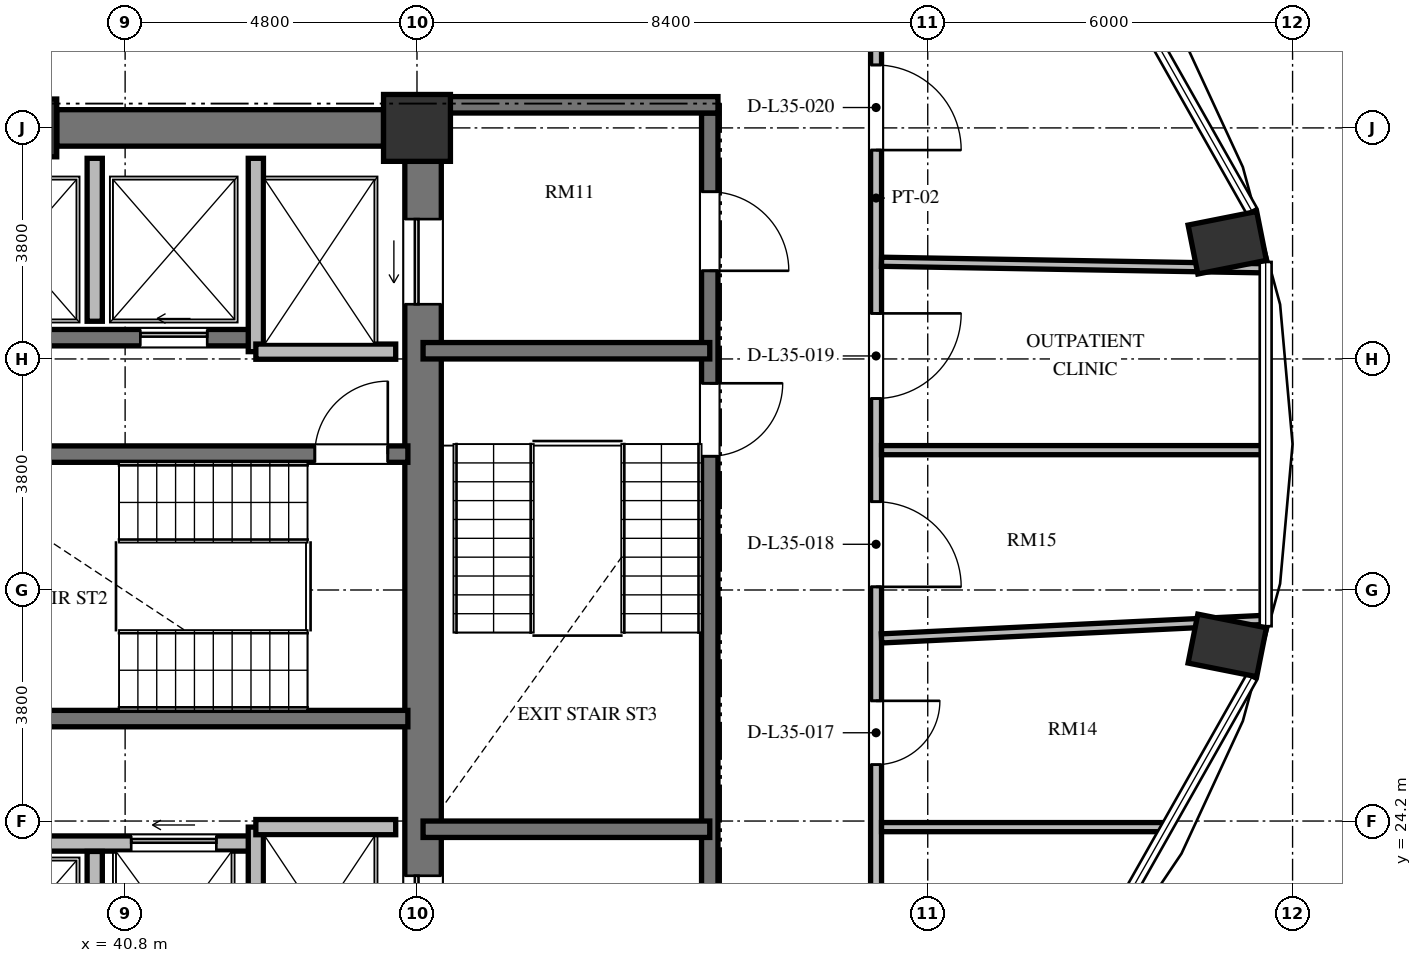
"""IFC4 building model, lengths in metres.
Left out: names, types, materials, properties, quantities, classifications, styles, units other than length and angle.
Written with IfcOpenShell. Run it as: python <this file> out.ifc"""

import sys

from ifc_helpers import new_model, si_unit, direction, frame, frame_2d, origin, origin_2d, place, context, subcontext, project, spatial, rectangle, extrude, element, fill, save


model = new_model("IFC4")
c1 = context("Model", 3, precision=1e-05, world=origin(), true_north=direction((0.0, 1.0)))
c2 = subcontext(c1, "Body", "Model", "MODEL_VIEW")
j1 = project(units=[si_unit("LENGTHUNIT", "METRE"), si_unit("PLANEANGLEUNIT", "RADIAN")], contexts=[c1])
p1 = place(None, origin())
s1 = spatial("IfcSite", under=j1, at=p1, CompositionType="ELEMENT")
p2 = place(p1, origin())
s2 = spatial("IfcBuilding", under=s1, at=p2, CompositionType="ELEMENT")
p3 = place(p2, frame((0.0, 0.0, 138.288)))
s3 = spatial("IfcBuildingStorey", under=s2, at=p3, CompositionType="ELEMENT", Elevation=138.288)
for number, where, z_axis, x_axis in (
    (1, (58.926, 27.088, 0.0), (0.0, 0.0, 1.0), (0.981, -0.195, 0.0)),
    (2, (58.926, 33.712, 0.0), (0.0, 0.0, 1.0), (0.981, 0.195, 0.0)),
):
    element("IfcColumn", number, at=place(p3, frame(where, z_axis=z_axis, x_axis=x_axis)), inside=s3, PredefinedType="COLUMN", context=c2, shape_type="SweptSolid", body=[
        extrude(rectangle(XDim=1.15, YDim=0.82, at=origin_2d()), origin(), (0.0, 0.0, 1.0), 3.648),
    ])
p4 = place(p3, frame((45.6, 35.6, 0.0), z_axis=(0.0, 0.0, 1.0), x_axis=(1.0, 0.0, 0.0)))
e3 = element("IfcColumn", 3, at=p4, inside=s3, PredefinedType="COLUMN", context=c2, shape_type="SweptSolid", body=[
    extrude(rectangle(XDim=1.1, YDim=1.1, at=origin_2d()), origin(), (0.0, 0.0, 1.0), 3.648),
])
p5 = place(p3, frame((39.2, 35.6, 0.0), z_axis=(0.0, 0.0, 1.0), x_axis=(1.0, 0.0, 0.0)))
e4 = element("IfcColumn", 4, at=p5, inside=s3, PredefinedType="COLUMN", context=c2, shape_type="SweptSolid", body=[
    extrude(rectangle(XDim=0.95, YDim=0.95, at=origin_2d()), origin(), (0.0, 0.0, 1.0), 3.648),
])
p6 = place(p3, frame((45.7, 20.95, 0.0), z_axis=(0.0, 0.0, 1.0), x_axis=(0.0, 1.0, 0.0)))
e5 = element("IfcWall", 5, at=p6, inside=s3, PredefinedType="SHEAR", context=c2, shape_type="SweptSolid", body=[
    extrude(rectangle(XDim=14.1, YDim=0.6, at=frame_2d((7.05, 0.0))), origin(), (0.0, 0.0, 1.0), 3.648),
])
p7 = place(p6, frame((11.75, 0.0, 0.0)))
e6 = element("IfcOpeningElement", 6, at=p7, cuts=e5, PredefinedType="OPENING", context=c2, shape_type="SweptSolid", body=[
    extrude(rectangle(XDim=1.4, YDim=2.3, at=frame_2d((0.7, 1.15))), frame((0.0, 0.31, 0.0), z_axis=(0.0, -1.0, 0.0), x_axis=(1.0, 0.0, 0.0)), (0.0, 0.0, 1.0), 0.62),
])
p8 = place(p6, frame((0.95, 0.0, 0.0)))
e7 = element("IfcOpeningElement", 7, at=p8, cuts=e5, PredefinedType="OPENING", context=c2, shape_type="SweptSolid", body=[
    extrude(rectangle(XDim=1.4, YDim=2.3, at=frame_2d((0.7, 1.15))), frame((0.0, 0.31, 0.0), z_axis=(0.0, -1.0, 0.0), x_axis=(1.0, 0.0, 0.0)), (0.0, 0.0, 1.0), 0.62),
])
p9 = place(p3, frame((39.675, 35.6, 0.0), z_axis=(0.0, 0.0, 1.0), x_axis=(1.0, 0.0, 0.0)))
e8 = element("IfcWall", 8, at=p9, inside=s3, PredefinedType="SHEAR", context=c2, shape_type="SweptSolid", body=[
    extrude(rectangle(XDim=5.375, YDim=0.6, at=frame_2d((2.688, 0.0))), origin(), (0.0, 0.0, 1.0), 3.648),
])
p10 = place(p3, frame((37.465, 30.235, 0.0), z_axis=(0.0, 0.0, 1.0), x_axis=(1.0, 0.0, 0.0)))
e9 = element("IfcWall", 9, at=p10, inside=s3, PredefinedType="SHEAR", context=c2, shape_type="SweptSolid", body=[
    extrude(rectangle(XDim=7.985, YDim=0.27, at=frame_2d((3.992, 0.0))), origin(), (0.0, 0.0, 1.0), 3.648),
])
p11 = place(p10, frame((6.455, 0.0, 0.0)))
e10 = element("IfcOpeningElement", 10, at=p11, cuts=e9, PredefinedType="OPENING", context=c2, shape_type="SweptSolid", body=[
    extrude(rectangle(XDim=1.2, YDim=2.15, at=frame_2d((0.6, 1.075))), frame((0.0, 0.145, 0.0), z_axis=(0.0, -1.0, 0.0), x_axis=(1.0, 0.0, 0.0)), (0.0, 0.0, 1.0), 0.29),
])
p12 = place(p3, frame((37.465, 25.885, 0.0), z_axis=(0.0, 0.0, 1.0), x_axis=(1.0, 0.0, 0.0)))
e11 = element("IfcWall", 11, at=p12, inside=s3, PredefinedType="SHEAR", context=c2, shape_type="SweptSolid", body=[
    extrude(rectangle(XDim=7.985, YDim=0.27, at=frame_2d((3.992, 0.0))), origin(), (0.0, 0.0, 1.0), 3.648),
])
p13 = place(p3, frame((26.55, 32.15, 0.0), z_axis=(0.0, 0.0, 1.0), x_axis=(1.0, 0.0, 0.0)))
e12 = element("IfcWall", 12, at=p13, inside=s3, PredefinedType="SHEAR", context=c2, shape_type="SweptSolid", body=[
    extrude(rectangle(XDim=16.4, YDim=0.27, at=frame_2d((8.2, 0.0))), origin(), (0.0, 0.0, 1.0), 3.648),
])
p14 = place(p13, frame((1.525, 0.0, 0.0)))
e13 = element("IfcOpeningElement", 13, at=p14, cuts=e12, PredefinedType="OPENING", context=c2, shape_type="SweptSolid", body=[
    extrude(rectangle(XDim=1.05, YDim=2.15, at=frame_2d((0.525, 1.075))), frame((0.0, 0.145, 0.0), z_axis=(0.0, -1.0, 0.0), x_axis=(1.0, 0.0, 0.0)), (0.0, 0.0, 1.0), 0.29),
])
p15 = place(p13, frame((4.275, 0.0, 0.0)))
e14 = element("IfcOpeningElement", 14, at=p15, cuts=e12, PredefinedType="OPENING", context=c2, shape_type="SweptSolid", body=[
    extrude(rectangle(XDim=0.95, YDim=2.1, at=frame_2d((0.475, 1.05))), frame((0.0, 0.145, 0.0), z_axis=(0.0, -1.0, 0.0), x_axis=(1.0, 0.0, 0.0)), (0.0, 0.0, 1.0), 0.29),
])
p16 = place(p13, frame((6.5, 0.0, 0.0)))
e15 = element("IfcOpeningElement", 15, at=p16, cuts=e12, PredefinedType="OPENING", context=c2, shape_type="SweptSolid", body=[
    extrude(rectangle(XDim=1.1, YDim=2.2, at=frame_2d((0.55, 1.1))), frame((0.0, 0.145, 0.0), z_axis=(0.0, -1.0, 0.0), x_axis=(1.0, 0.0, 0.0)), (0.0, 0.0, 1.0), 0.29),
])
p17 = place(p13, frame((9.1, 0.0, 0.0)))
e16 = element("IfcOpeningElement", 16, at=p17, cuts=e12, PredefinedType="OPENING", context=c2, shape_type="SweptSolid", body=[
    extrude(rectangle(XDim=1.1, YDim=2.2, at=frame_2d((0.55, 1.1))), frame((0.0, 0.145, 0.0), z_axis=(0.0, -1.0, 0.0), x_axis=(1.0, 0.0, 0.0)), (0.0, 0.0, 1.0), 0.29),
])
p18 = place(p13, frame((11.9, 0.0, 0.0)))
e17 = element("IfcOpeningElement", 17, at=p18, cuts=e12, PredefinedType="OPENING", context=c2, shape_type="SweptSolid", body=[
    extrude(rectangle(XDim=1.1, YDim=2.2, at=frame_2d((0.55, 1.1))), frame((0.0, 0.145, 0.0), z_axis=(0.0, -1.0, 0.0), x_axis=(1.0, 0.0, 0.0)), (0.0, 0.0, 1.0), 0.29),
])
p19 = place(p13, frame((14.5, 0.0, 0.0)))
e18 = element("IfcOpeningElement", 18, at=p19, cuts=e12, PredefinedType="OPENING", context=c2, shape_type="SweptSolid", body=[
    extrude(rectangle(XDim=1.1, YDim=2.2, at=frame_2d((0.55, 1.1))), frame((0.0, 0.145, 0.0), z_axis=(0.0, -1.0, 0.0), x_axis=(1.0, 0.0, 0.0)), (0.0, 0.0, 1.0), 0.29),
])
p20 = place(p3, frame((26.75, 23.83, 0.0), z_axis=(0.0, 0.0, 1.0), x_axis=(1.0, 0.0, 0.0)))
e19 = element("IfcWall", 19, at=p20, inside=s3, PredefinedType="SOLIDWALL", context=c2, shape_type="SweptSolid", body=[
    extrude(rectangle(XDim=16.2, YDim=0.25, at=frame_2d((8.1, 0.0))), origin(), (0.0, 0.0, 1.0), 3.428),
])
p21 = place(p20, frame((0.335, 0.0, 0.0)))
e20 = element("IfcOpeningElement", 20, at=p21, cuts=e19, PredefinedType="OPENING", context=c2, shape_type="SweptSolid", body=[
    extrude(rectangle(XDim=0.95, YDim=2.1, at=frame_2d((0.475, 1.05))), frame((0.0, 0.135, 0.0), z_axis=(0.0, -1.0, 0.0), x_axis=(1.0, 0.0, 0.0)), (0.0, 0.0, 1.0), 0.27),
])
p22 = place(p20, frame((2.975, 0.0, 0.0)))
e21 = element("IfcOpeningElement", 21, at=p22, cuts=e19, PredefinedType="OPENING", context=c2, shape_type="SweptSolid", body=[
    extrude(rectangle(XDim=1.05, YDim=2.15, at=frame_2d((0.525, 1.075))), frame((0.0, 0.135, 0.0), z_axis=(0.0, -1.0, 0.0), x_axis=(1.0, 0.0, 0.0)), (0.0, 0.0, 1.0), 0.27),
])
p23 = place(p20, frame((6.3, 0.0, 0.0)))
e22 = element("IfcOpeningElement", 22, at=p23, cuts=e19, PredefinedType="OPENING", context=c2, shape_type="SweptSolid", body=[
    extrude(rectangle(XDim=1.1, YDim=2.2, at=frame_2d((0.55, 1.1))), frame((0.0, 0.135, 0.0), z_axis=(0.0, -1.0, 0.0), x_axis=(1.0, 0.0, 0.0)), (0.0, 0.0, 1.0), 0.27),
])
p24 = place(p20, frame((8.9, 0.0, 0.0)))
e23 = element("IfcOpeningElement", 23, at=p24, cuts=e19, PredefinedType="OPENING", context=c2, shape_type="SweptSolid", body=[
    extrude(rectangle(XDim=1.1, YDim=2.2, at=frame_2d((0.55, 1.1))), frame((0.0, 0.135, 0.0), z_axis=(0.0, -1.0, 0.0), x_axis=(1.0, 0.0, 0.0)), (0.0, 0.0, 1.0), 0.27),
])
p25 = place(p20, frame((11.7, 0.0, 0.0)))
e24 = element("IfcOpeningElement", 24, at=p25, cuts=e19, PredefinedType="OPENING", context=c2, shape_type="SweptSolid", body=[
    extrude(rectangle(XDim=1.1, YDim=2.2, at=frame_2d((0.55, 1.1))), frame((0.0, 0.135, 0.0), z_axis=(0.0, -1.0, 0.0), x_axis=(1.0, 0.0, 0.0)), (0.0, 0.0, 1.0), 0.27),
])
p26 = place(p20, frame((14.15, 0.0, 0.0)))
e25 = element("IfcOpeningElement", 25, at=p26, cuts=e19, PredefinedType="OPENING", context=c2, shape_type="SweptSolid", body=[
    extrude(rectangle(XDim=1.4, YDim=2.3, at=frame_2d((0.7, 1.15))), frame((0.0, 0.135, 0.0), z_axis=(0.0, -1.0, 0.0), x_axis=(1.0, 0.0, 0.0)), (0.0, 0.0, 1.0), 0.27),
])
p27 = place(p3, frame((42.95, 31.92, 0.0), z_axis=(0.0, 0.0, 1.0), x_axis=(0.0, 1.0, 0.0)))
e26 = element("IfcWall", 26, at=p27, inside=s3, PredefinedType="SOLIDWALL", context=c2, shape_type="SweptSolid", body=[
    extrude(rectangle(XDim=3.18, YDim=0.25, at=frame_2d((1.59, 0.0))), origin(), (0.0, 0.0, 1.0), 3.428),
])
p28 = place(p3, frame((42.95, 31.92, 0.0), z_axis=(0.0, 0.0, 1.0), x_axis=(1.0, 0.0, 0.0)))
e27 = element("IfcWall", 27, at=p28, inside=s3, PredefinedType="SOLIDWALL", context=c2, shape_type="SweptSolid", body=[
    extrude(rectangle(XDim=2.3, YDim=0.25, at=frame_2d((1.15, 0.0))), origin(), (0.0, 0.0, 1.0), 3.428),
])
p29 = place(p3, frame((42.95, 20.9, 0.0), z_axis=(0.0, 0.0, 1.0), x_axis=(0.0, 1.0, 0.0)))
e28 = element("IfcWall", 28, at=p29, inside=s3, PredefinedType="SOLIDWALL", context=c2, shape_type="SweptSolid", body=[
    extrude(rectangle(XDim=3.2, YDim=0.25, at=frame_2d((1.6, 0.0))), origin(), (0.0, 0.0, 1.0), 3.428),
])
p30 = place(p3, frame((42.95, 24.1, 0.0), z_axis=(0.0, 0.0, 1.0), x_axis=(1.0, 0.0, 0.0)))
e29 = element("IfcWall", 29, at=p30, inside=s3, PredefinedType="SOLIDWALL", context=c2, shape_type="SweptSolid", body=[
    extrude(rectangle(XDim=2.3, YDim=0.25, at=frame_2d((1.15, 0.0))), origin(), (0.0, 0.0, 1.0), 3.428),
])
p31 = place(p3, frame((40.3, 32.42, 0.0), z_axis=(0.0, 0.0, 1.0), x_axis=(0.0, 1.0, 0.0)))
e30 = element("IfcWall", 30, at=p31, inside=s3, PredefinedType="SOLIDWALL", context=c2, shape_type="SweptSolid", body=[
    extrude(rectangle(XDim=2.68, YDim=0.25, at=frame_2d((1.34, 0.0))), origin(), (0.0, 0.0, 1.0), 3.428),
])
p32 = place(p3, frame((40.3, 20.9, 0.0), z_axis=(0.0, 0.0, 1.0), x_axis=(0.0, 1.0, 0.0)))
e31 = element("IfcWall", 31, at=p32, inside=s3, PredefinedType="SOLIDWALL", context=c2, shape_type="SweptSolid", body=[
    extrude(rectangle(XDim=2.8, YDim=0.25, at=frame_2d((1.4, 0.0))), origin(), (0.0, 0.0, 1.0), 3.428),
])
p33 = place(p3, frame((50.415, 35.845, 0.0), z_axis=(0.0, 0.0, 1.0), x_axis=(0.0, -1.0, 0.0)))
e32 = element("IfcWall", 32, at=p33, inside=s3, PredefinedType="SHEAR", context=c2, shape_type="SweptSolid", body=[
    extrude(rectangle(XDim=15.825, YDim=0.27, at=frame_2d((7.913, 0.0))), origin(), (0.0, 0.0, 1.0), 3.648),
])
p34 = place(p33, frame((4.445, 0.0, 0.0)))
e33 = element("IfcOpeningElement", 33, at=p34, cuts=e32, PredefinedType="OPENING", context=c2, shape_type="SweptSolid", body=[
    extrude(rectangle(XDim=1.2, YDim=2.15, at=frame_2d((0.6, 1.075))), frame((0.0, 0.145, 0.0), z_axis=(0.0, -1.0, 0.0), x_axis=(1.0, 0.0, 0.0)), (0.0, 0.0, 1.0), 0.29),
])
p35 = place(p33, frame((1.295, 0.0, 0.0)))
e34 = element("IfcOpeningElement", 34, at=p35, cuts=e32, PredefinedType="OPENING", context=c2, shape_type="SweptSolid", body=[
    extrude(rectangle(XDim=1.3, YDim=2.2, at=frame_2d((0.65, 1.1))), frame((0.0, 0.145, 0.0), z_axis=(0.0, -1.0, 0.0), x_axis=(1.0, 0.0, 0.0)), (0.0, 0.0, 1.0), 0.29),
])
p36 = place(p33, frame((13.095, 0.0, 0.0)))
e35 = element("IfcOpeningElement", 35, at=p36, cuts=e32, PredefinedType="OPENING", context=c2, shape_type="SweptSolid", body=[
    extrude(rectangle(XDim=1.3, YDim=2.2, at=frame_2d((0.65, 1.1))), frame((0.0, 0.145, 0.0), z_axis=(0.0, -1.0, 0.0), x_axis=(1.0, 0.0, 0.0)), (0.0, 0.0, 1.0), 0.29),
])
p37 = place(p3, frame((46.0, 35.98, 0.0), z_axis=(0.0, 0.0, 1.0), x_axis=(1.0, 0.0, 0.0)))
e36 = element("IfcWall", 36, at=p37, inside=s3, PredefinedType="SHEAR", context=c2, shape_type="SweptSolid", body=[
    extrude(rectangle(XDim=4.55, YDim=0.27, at=frame_2d((2.275, 0.0))), origin(), (0.0, 0.0, 1.0), 3.648),
])
for number, where, z_axis, x_axis in (
    (37, (45.7, 31.935, 0.0), (0.0, 0.0, 1.0), (1.0, 0.0, 0.0)),
    (38, (45.7, 24.065, 0.0), (0.0, 0.0, 1.0), (1.0, 0.0, 0.0)),
):
    element("IfcWall", number, at=place(p3, frame(where, z_axis=z_axis, x_axis=x_axis)), inside=s3, PredefinedType="SHEAR", context=c2, shape_type="SweptSolid", body=[
        extrude(rectangle(XDim=4.715, YDim=0.27, at=frame_2d((2.357, 0.0))), origin(), (0.0, 0.0, 1.0), 3.648),
    ])
p38 = place(p3, frame((53.15, 38.79, 0.0), z_axis=(0.0, 0.0, 1.0), x_axis=(0.0, -1.0, 0.0)))
e39 = element("IfcWall", 39, at=p38, inside=s3, PredefinedType="PARTITIONING", context=c2, shape_type="SweptSolid", body=[
    extrude(rectangle(XDim=17.374, YDim=0.18, at=frame_2d((8.687, 0.0))), origin(), (0.0, 0.0, 1.0), 3.428),
])
p39 = place(p38, frame((12.613, 0.0, 0.0)))
e40 = element("IfcOpeningElement", 40, at=p39, cuts=e39, PredefinedType="OPENING", context=c2, shape_type="SweptSolid", body=[
    extrude(rectangle(XDim=1.05, YDim=2.15, at=frame_2d((0.525, 1.075))), frame((0.0, 0.1, 0.0), z_axis=(0.0, -1.0, 0.0), x_axis=(1.0, 0.0, 0.0)), (0.0, 0.0, 1.0), 0.2),
])
p40 = place(p38, frame((9.338, 0.0, 0.0)))
e41 = element("IfcOpeningElement", 41, at=p40, cuts=e39, PredefinedType="OPENING", context=c2, shape_type="SweptSolid", body=[
    extrude(rectangle(XDim=1.4, YDim=2.2, at=frame_2d((0.7, 1.1))), frame((0.0, 0.1, 0.0), z_axis=(0.0, -1.0, 0.0), x_axis=(1.0, 0.0, 0.0)), (0.0, 0.0, 1.0), 0.2),
])
p41 = place(p38, frame((6.241, 0.0, 0.0)))
e42 = element("IfcOpeningElement", 42, at=p41, cuts=e39, PredefinedType="OPENING", context=c2, shape_type="SweptSolid", body=[
    extrude(rectangle(XDim=1.4, YDim=2.2, at=frame_2d((0.7, 1.1))), frame((0.0, 0.1, 0.0), z_axis=(0.0, -1.0, 0.0), x_axis=(1.0, 0.0, 0.0)), (0.0, 0.0, 1.0), 0.2),
])
p42 = place(p38, frame((2.155, 0.0, 0.0)))
e43 = element("IfcOpeningElement", 43, at=p42, cuts=e39, PredefinedType="OPENING", context=c2, shape_type="SweptSolid", body=[
    extrude(rectangle(XDim=1.4, YDim=2.2, at=frame_2d((0.7, 1.1))), frame((0.0, 0.1, 0.0), z_axis=(0.0, -1.0, 0.0), x_axis=(1.0, 0.0, 0.0)), (0.0, 0.0, 1.0), 0.2),
])
p43 = place(p3, frame((53.24, 24.1, 0.0), z_axis=(0.0, 0.0, 1.0), x_axis=(1.0, 0.0, 0.0)))
e44 = element("IfcWall", 44, at=p43, inside=s3, PredefinedType="PARTITIONING", context=c2, shape_type="SweptSolid", body=[
    extrude(rectangle(XDim=4.687, YDim=0.15, at=frame_2d((2.343, 0.0))), origin(), (0.0, 0.0, 1.0), 3.428),
])
p44 = place(p3, frame((53.24, 27.204, 0.0), z_axis=(0.0, 0.0, 1.0), x_axis=(0.99882763896, 0.0484081362, 0.0)))
e45 = element("IfcWall", 45, at=p44, inside=s3, PredefinedType="PARTITIONING", context=c2, shape_type="SweptSolid", body=[
    extrude(rectangle(XDim=6.329, YDim=0.15, at=frame_2d((3.165, 0.0))), origin(), (0.0, 0.0, 1.0), 3.428),
])
p45 = place(p3, frame((53.24, 30.3, 0.0), z_axis=(0.0, 0.0, 1.0), x_axis=(1.0, 0.0, 0.0)))
e46 = element("IfcWall", 46, at=p45, inside=s3, PredefinedType="PARTITIONING", context=c2, shape_type="SweptSolid", body=[
    extrude(rectangle(XDim=6.307, YDim=0.15, at=frame_2d((3.154, 0.0))), origin(), (0.0, 0.0, 1.0), 3.428),
])
p46 = place(p3, frame((53.24, 33.399, 0.0), z_axis=(0.0, 0.0, 1.0), x_axis=(0.999852374284, -0.017182247791, 0.0)))
e47 = element("IfcWall", 47, at=p46, inside=s3, PredefinedType="PARTITIONING", context=c2, shape_type="SweptSolid", body=[
    extrude(rectangle(XDim=6.323, YDim=0.15, at=frame_2d((3.162, 0.0))), origin(), (0.0, 0.0, 1.0), 3.428),
])
p47 = place(p11, origin())
e48 = element("IfcDoor", 48, at=p47, inside=s3, OperationType="SINGLE_SWING_RIGHT", PredefinedType="DOOR", context=c2, shape_type="SweptSolid", body=[
    extrude(rectangle(XDim=1.2, YDim=2.15, at=frame_2d((0.6, 1.075))), frame((0.0, 0.025, 0.0), z_axis=(0.0, -1.0, 0.0), x_axis=(1.0, 0.0, 0.0)), (0.0, 0.0, 1.0), 0.05),
])
fill(e10, e48)
p48 = place(p19, origin())
e49 = element("IfcDoor", 49, at=p48, inside=s3, OperationType="SLIDING_TO_LEFT", PredefinedType="DOOR", context=c2, shape_type="SweptSolid", body=[
    extrude(rectangle(XDim=1.1, YDim=2.2, at=frame_2d((0.55, 1.1))), frame((0.0, 0.025, 0.0), z_axis=(0.0, -1.0, 0.0), x_axis=(1.0, 0.0, 0.0)), (0.0, 0.0, 1.0), 0.05),
])
fill(e18, e49)
p49 = place(p7, origin())
e50 = element("IfcDoor", 50, at=p49, inside=s3, OperationType="SLIDING_TO_LEFT", PredefinedType="DOOR", context=c2, shape_type="SweptSolid", body=[
    extrude(rectangle(XDim=1.4, YDim=2.3, at=frame_2d((0.7, 1.15))), frame((0.0, 0.025, 0.0), z_axis=(0.0, -1.0, 0.0), x_axis=(1.0, 0.0, 0.0)), (0.0, 0.0, 1.0), 0.05),
])
fill(e6, e50)
p50 = place(p8, origin())
e51 = element("IfcDoor", 51, at=p50, inside=s3, OperationType="SLIDING_TO_LEFT", PredefinedType="DOOR", context=c2, shape_type="SweptSolid", body=[
    extrude(rectangle(XDim=1.4, YDim=2.3, at=frame_2d((0.7, 1.15))), frame((0.0, 0.025, 0.0), z_axis=(0.0, -1.0, 0.0), x_axis=(1.0, 0.0, 0.0)), (0.0, 0.0, 1.0), 0.05),
])
fill(e7, e51)
p51 = place(p26, origin())
e52 = element("IfcDoor", 52, at=p51, inside=s3, OperationType="SLIDING_TO_LEFT", PredefinedType="DOOR", context=c2, shape_type="SweptSolid", body=[
    extrude(rectangle(XDim=1.4, YDim=2.3, at=frame_2d((0.7, 1.15))), frame((0.0, 0.025, 0.0), z_axis=(0.0, -1.0, 0.0), x_axis=(1.0, 0.0, 0.0)), (0.0, 0.0, 1.0), 0.05),
])
fill(e25, e52)
p52 = place(p34, origin())
e53 = element("IfcDoor", 53, at=p52, inside=s3, OperationType="SINGLE_SWING_LEFT", PredefinedType="DOOR", context=c2, shape_type="SweptSolid", body=[
    extrude(rectangle(XDim=1.2, YDim=2.15, at=frame_2d((0.6, 1.075))), frame((0.0, 0.025, 0.0), z_axis=(0.0, -1.0, 0.0), x_axis=(1.0, 0.0, 0.0)), (0.0, 0.0, 1.0), 0.05),
])
fill(e33, e53)
p53 = place(p35, origin())
e54 = element("IfcDoor", 54, at=p53, inside=s3, OperationType="SINGLE_SWING_RIGHT", PredefinedType="DOOR", context=c2, shape_type="SweptSolid", body=[
    extrude(rectangle(XDim=1.3, YDim=2.2, at=frame_2d((0.65, 1.1))), frame((0.0, 0.025, 0.0), z_axis=(0.0, -1.0, 0.0), x_axis=(1.0, 0.0, 0.0)), (0.0, 0.0, 1.0), 0.05),
])
fill(e34, e54)
p54 = place(p39, origin())
e55 = element("IfcDoor", 55, at=p54, inside=s3, OperationType="SINGLE_SWING_LEFT", PredefinedType="DOOR", context=c2, shape_type="SweptSolid", body=[
    extrude(rectangle(XDim=1.05, YDim=2.15, at=frame_2d((0.525, 1.075))), frame((0.0, 0.025, 0.0), z_axis=(0.0, -1.0, 0.0), x_axis=(1.0, 0.0, 0.0)), (0.0, 0.0, 1.0), 0.05),
])
fill(e40, e55)
p55 = place(p40, origin())
e56 = element("IfcDoor", 56, at=p55, inside=s3, OperationType="SINGLE_SWING_RIGHT", PredefinedType="DOOR", context=c2, shape_type="SweptSolid", body=[
    extrude(rectangle(XDim=1.4, YDim=2.2, at=frame_2d((0.7, 1.1))), frame((0.0, 0.025, 0.0), z_axis=(0.0, -1.0, 0.0), x_axis=(1.0, 0.0, 0.0)), (0.0, 0.0, 1.0), 0.05),
])
fill(e41, e56)
p56 = place(p41, origin())
e57 = element("IfcDoor", 57, at=p56, inside=s3, OperationType="SINGLE_SWING_LEFT", PredefinedType="DOOR", context=c2, shape_type="SweptSolid", body=[
    extrude(rectangle(XDim=1.4, YDim=2.2, at=frame_2d((0.7, 1.1))), frame((0.0, 0.025, 0.0), z_axis=(0.0, -1.0, 0.0), x_axis=(1.0, 0.0, 0.0)), (0.0, 0.0, 1.0), 0.05),
])
fill(e42, e57)
p57 = place(p42, origin())
e58 = element("IfcDoor", 58, at=p57, inside=s3, OperationType="SINGLE_SWING_RIGHT", PredefinedType="DOOR", context=c2, shape_type="SweptSolid", body=[
    extrude(rectangle(XDim=1.4, YDim=2.2, at=frame_2d((0.7, 1.1))), frame((0.0, 0.025, 0.0), z_axis=(0.0, -1.0, 0.0), x_axis=(1.0, 0.0, 0.0)), (0.0, 0.0, 1.0), 0.05),
])
fill(e43, e58)
save(model, sys.argv[1])
